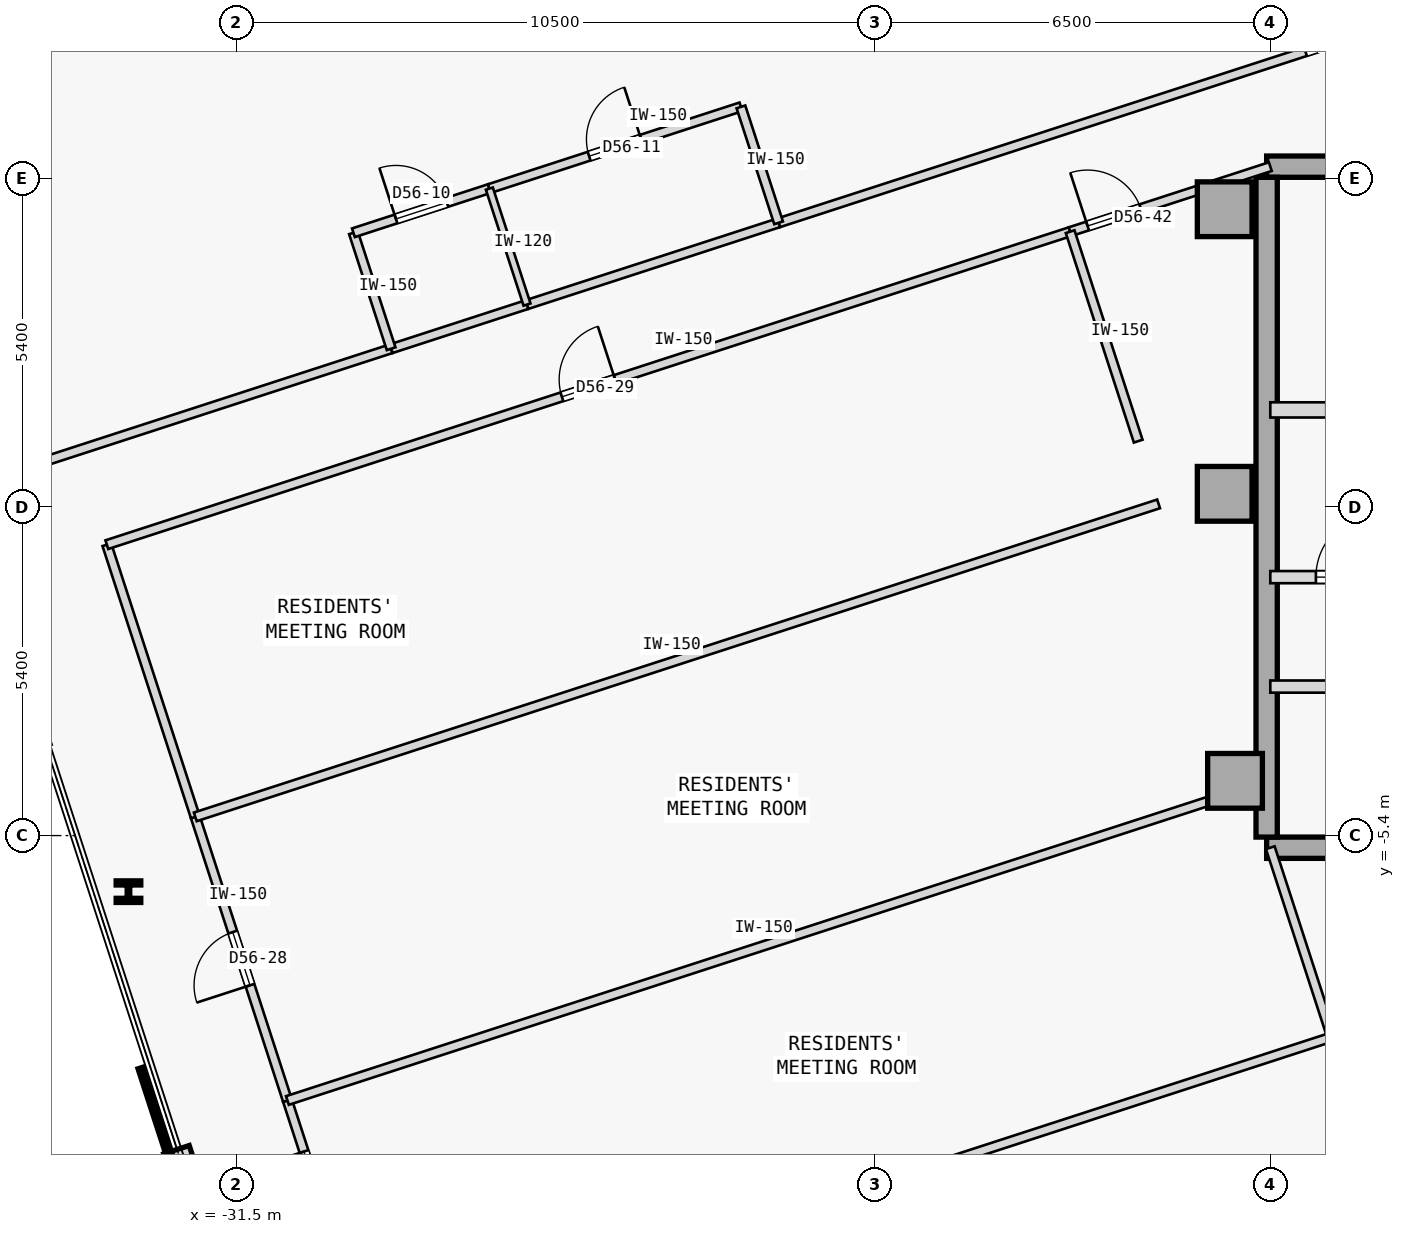
"""IFC4 building model, lengths in metres.
Left out: names, types, materials, properties, quantities, classifications, styles, units other than length and angle.
Written with IfcOpenShell. Run it as: python <this file> out.ifc"""

import sys

from ifc_helpers import new_model, si_unit, direction, frame, frame_2d, origin, origin_2d, place, context, subcontext, project, spatial, rectangle, i_section, extrude, element, fill, save


model = new_model("IFC4")
c1 = context("Model", 3, precision=1e-05, world=origin(), true_north=direction((0.0, 1.0)))
c2 = subcontext(c1, "Body", "Model", "MODEL_VIEW")
j1 = project(units=[si_unit("LENGTHUNIT", "METRE"), si_unit("PLANEANGLEUNIT", "RADIAN")], contexts=[c1])
p1 = place(None, origin())
s1 = spatial("IfcSite", under=j1, at=p1, CompositionType="ELEMENT")
p2 = place(p1, origin())
s2 = spatial("IfcBuilding", under=s1, at=p2, CompositionType="ELEMENT")
p3 = place(p2, frame((0.0, 0.0, 214.25)))
s3 = spatial("IfcBuildingStorey", under=s2, at=p3, CompositionType="ELEMENT", Elevation=214.25)
for number, where, z_axis, x_axis in (
    (1, (-15.25, 4.9, 0.0), (0.0, 0.0, 1.0), (1.0, 0.0, 0.0)),
    (2, (-15.25, 0.22, 0.0), (0.0, 0.0, 1.0), (1.0, 0.0, 0.0)),
    (3, (-15.08, -4.5, 0.0), (0.0, 0.0, 1.0), (1.0, 0.0, 0.0)),
):
    element("IfcColumn", number, at=place(p3, frame(where, z_axis=z_axis, x_axis=x_axis)), inside=s3, PredefinedType="COLUMN", context=c2, shape_type="SweptSolid", body=[
        extrude(rectangle(XDim=0.9, YDim=0.9, at=origin_2d()), origin(), (0.0, 0.0, 1.0), 3.35),
    ])
p4 = place(p3, frame((-14.56, 5.6, 0.0), z_axis=(0.0, 0.0, 1.0), x_axis=(1.0, 0.0, 0.0)))
e4 = element("IfcWall", 4, at=p4, inside=s3, PredefinedType="SHEAR", context=c2, shape_type="SweptSolid", body=[
    extrude(rectangle(XDim=11.41, YDim=0.35, at=frame_2d((5.705, 0.0))), origin(), (0.0, 0.0, 1.0), 3.125),
])
p5 = place(p3, frame((-14.56, -5.6, 0.0), z_axis=(0.0, 0.0, 1.0), x_axis=(1.0, 0.0, 0.0)))
e5 = element("IfcWall", 5, at=p5, inside=s3, PredefinedType="SHEAR", context=c2, shape_type="SweptSolid", body=[
    extrude(rectangle(XDim=10.86, YDim=0.35, at=frame_2d((5.43, 0.0))), origin(), (0.0, 0.0, 1.0), 3.125),
])
p6 = place(p3, frame((-14.56, -5.425, 0.0), z_axis=(0.0, 0.0, 1.0), x_axis=(0.0, 1.0, 0.0)))
e6 = element("IfcWall", 6, at=p6, inside=s3, PredefinedType="SHEAR", context=c2, shape_type="SweptSolid", body=[
    extrude(rectangle(XDim=10.85, YDim=0.35, at=frame_2d((5.425, 0.0))), origin(), (0.0, 0.0, 1.0), 3.125),
])
p7 = place(p3, frame((-33.278, -6.322, 0.0), z_axis=(0.0, 0.0, 1.0), x_axis=(1.0, 0.0, 0.0)))
e7 = element("IfcColumn", 7, at=p7, inside=s3, PredefinedType="COLUMN", context=c2, shape_type="SweptSolid", body=[
    extrude(i_section(OverallWidth=0.405, OverallDepth=0.355, WebThickness=0.042, FlangeThickness=0.068, FilletRadius=0.015, at=origin_2d()), origin(), (0.0, 0.0, 1.0), 3.35),
])
p8 = place(p3, frame((-14.5, 1.6, 0.0), z_axis=(0.0, 0.0, 1.0), x_axis=(1.0, 0.0, 0.0)))
e8 = element("IfcWall", 8, at=p8, inside=s3, PredefinedType="STANDARD", context=c2, shape_type="SweptSolid", body=[
    extrude(rectangle(XDim=3.6, YDim=0.25, at=frame_2d((1.8, 0.0))), origin(), (0.0, 0.0, 1.0), 3.125),
])
p9 = place(p8, frame((0.92, 0.0, 0.0)))
e9 = element("IfcOpeningElement", 9, at=p9, cuts=e8, PredefinedType="OPENING", context=c2, shape_type="SweptSolid", body=[
    extrude(rectangle(XDim=1.05, YDim=2.15, at=frame_2d((0.525, 1.075))), frame((0.0, 0.135, 0.0), z_axis=(0.0, -1.0, 0.0), x_axis=(1.0, 0.0, 0.0)), (0.0, 0.0, 1.0), 0.27),
])
p10 = place(p3, frame((-14.5, -1.15, 0.0), z_axis=(0.0, 0.0, 1.0), x_axis=(1.0, 0.0, 0.0)))
e10 = element("IfcWall", 10, at=p10, inside=s3, PredefinedType="STANDARD", context=c2, shape_type="SweptSolid", body=[
    extrude(rectangle(XDim=2.95, YDim=0.2, at=frame_2d((1.475, 0.0))), origin(), (0.0, 0.0, 1.0), 3.125),
])
p11 = place(p10, frame((0.75, 0.0, 0.0)))
e11 = element("IfcOpeningElement", 11, at=p11, cuts=e10, PredefinedType="OPENING", context=c2, shape_type="SweptSolid", body=[
    extrude(rectangle(XDim=1.05, YDim=2.18, at=frame_2d((0.525, 1.09))), frame((0.0, 0.11, 0.0), z_axis=(0.0, -1.0, 0.0), x_axis=(1.0, 0.0, 0.0)), (0.0, 0.0, 1.0), 0.22),
])
p12 = place(p3, frame((-14.5, -2.95, 0.0), z_axis=(0.0, 0.0, 1.0), x_axis=(1.0, 0.0, 0.0)))
e12 = element("IfcWall", 12, at=p12, inside=s3, PredefinedType="STANDARD", context=c2, shape_type="SweptSolid", body=[
    extrude(rectangle(XDim=10.8, YDim=0.2, at=frame_2d((5.4, 0.0))), origin(), (0.0, 0.0, 1.0), 3.125),
])
p13 = place(p12, frame((9.17, 0.0, 0.0)))
e13 = element("IfcOpeningElement", 13, at=p13, cuts=e12, PredefinedType="OPENING", context=c2, shape_type="SweptSolid", body=[
    extrude(rectangle(XDim=1.1, YDim=2.15, at=frame_2d((0.55, 1.075))), frame((0.0, 0.11, 0.0), z_axis=(0.0, -1.0, 0.0), x_axis=(1.0, 0.0, 0.0)), (0.0, 0.0, 1.0), 0.22),
])
p14 = place(p12, frame((2.13, 0.0, 0.0)))
e14 = element("IfcOpeningElement", 14, at=p14, cuts=e12, PredefinedType="OPENING", context=c2, shape_type="SweptSolid", body=[
    extrude(rectangle(XDim=0.92, YDim=2.15, at=frame_2d((0.46, 1.075))), frame((0.0, 0.11, 0.0), z_axis=(0.0, -1.0, 0.0), x_axis=(1.0, 0.0, 0.0)), (0.0, 0.0, 1.0), 0.22),
])
p15 = place(p12, frame((6.45, 0.0, 0.0)))
e15 = element("IfcOpeningElement", 15, at=p15, cuts=e12, PredefinedType="OPENING", context=c2, shape_type="SweptSolid", body=[
    extrude(rectangle(XDim=0.92, YDim=2.15, at=frame_2d((0.46, 1.075))), frame((0.0, 0.11, 0.0), z_axis=(0.0, -1.0, 0.0), x_axis=(1.0, 0.0, 0.0)), (0.0, 0.0, 1.0), 0.22),
])
p16 = place(p3, frame((-36.012, 0.314, 0.0), z_axis=(0.0, 0.0, 1.0), x_axis=(0.951055595173, 0.309019829283, 0.0)))
e16 = element("IfcWall", 16, at=p16, inside=s3, PredefinedType="PARTITIONING", context=c2, shape_type="SweptSolid", body=[
    extrude(rectangle(XDim=7.417, YDim=0.15, at=frame_2d((3.708, 0.0))), origin(), (0.0, 0.0, 1.0), 3.125),
])
p17 = place(p3, frame((-22.586, 4.677, 0.0), z_axis=(0.0, 0.0, 1.0), x_axis=(0.951057743275, 0.309013218095, 0.0)))
e17 = element("IfcWall", 17, at=p17, inside=s3, PredefinedType="PARTITIONING", context=c2, shape_type="SweptSolid", body=[
    extrude(rectangle(XDim=19.171, YDim=0.15, at=frame_2d((9.585, 0.0))), origin(), (0.0, 0.0, 1.0), 3.125),
])
p18 = place(p17, frame((9.111, 0.0, 0.0)))
e18 = element("IfcOpeningElement", 18, at=p18, cuts=e17, PredefinedType="OPENING", context=c2, shape_type="SweptSolid", body=[
    extrude(rectangle(XDim=0.95, YDim=2.15, at=frame_2d((0.475, 1.075))), frame((0.0, 0.085, 0.0), z_axis=(0.0, -1.0, 0.0), x_axis=(1.0, 0.0, 0.0)), (0.0, 0.0, 1.0), 0.17),
])
p19 = place(p3, frame((-28.958, 2.606, 0.0), z_axis=(0.0, 0.0, 1.0), x_axis=(0.951076048914, 0.308956872689, 0.0)))
e19 = element("IfcWall", 19, at=p19, inside=s3, PredefinedType="PARTITIONING", context=c2, shape_type="SweptSolid", body=[
    extrude(rectangle(XDim=2.35, YDim=0.15, at=frame_2d((1.175, 0.0))), origin(), (0.0, 0.0, 1.0), 3.125),
])
p20 = place(p3, frame((-26.723, 3.332, 0.0), z_axis=(0.0, 0.0, 1.0), x_axis=(0.951052627573, 0.309028962374, 0.0)))
e20 = element("IfcWall", 20, at=p20, inside=s3, PredefinedType="PARTITIONING", context=c2, shape_type="SweptSolid", body=[
    extrude(rectangle(XDim=4.35, YDim=0.15, at=frame_2d((2.175, 0.0))), origin(), (0.0, 0.0, 1.0), 3.125),
])
p21 = place(p3, frame((-29.833, -12.311, 0.0), z_axis=(0.0, 0.0, 1.0), x_axis=(-0.309044953986, 0.951047431213, 0.0)))
e21 = element("IfcWall", 21, at=p21, inside=s3, PredefinedType="PARTITIONING", context=c2, shape_type="SweptSolid", body=[
    extrude(rectangle(XDim=2.685, YDim=0.15, at=frame_2d((1.343, 0.0))), origin(), (0.0, 0.0, 1.0), 3.125),
])
p22 = place(p21, frame((0.883, 0.0, 0.0)))
e22 = element("IfcOpeningElement", 22, at=p22, cuts=e21, PredefinedType="OPENING", context=c2, shape_type="SweptSolid", body=[
    extrude(rectangle(XDim=0.92, YDim=2.15, at=frame_2d((0.46, 1.075))), frame((0.0, 0.085, 0.0), z_axis=(0.0, -1.0, 0.0), x_axis=(1.0, 0.0, 0.0)), (0.0, 0.0, 1.0), 0.17),
])
p23 = place(p3, frame((-30.663, -9.757, 0.0), z_axis=(0.0, 0.0, 1.0), x_axis=(-0.309019653166, 0.951055652397, 0.0)))
e23 = element("IfcWall", 23, at=p23, inside=s3, PredefinedType="PARTITIONING", context=c2, shape_type="SweptSolid", body=[
    extrude(rectangle(XDim=4.904, YDim=0.15, at=frame_2d((2.452, 0.0))), origin(), (0.0, 0.0, 1.0), 3.125),
])
p24 = place(p23, frame((1.992, 0.0, 0.0)))
e24 = element("IfcOpeningElement", 24, at=p24, cuts=e23, PredefinedType="OPENING", context=c2, shape_type="SweptSolid", body=[
    extrude(rectangle(XDim=0.92, YDim=2.15, at=frame_2d((0.46, 1.075))), frame((0.0, 0.085, 0.0), z_axis=(0.0, -1.0, 0.0), x_axis=(1.0, 0.0, 0.0)), (0.0, 0.0, 1.0), 0.17),
])
p25 = place(p3, frame((-32.179, -5.093, 0.0), z_axis=(0.0, 0.0, 1.0), x_axis=(-0.309014532869, 0.951057316083, 0.0)))
e25 = element("IfcWall", 25, at=p25, inside=s3, PredefinedType="PARTITIONING", context=c2, shape_type="SweptSolid", body=[
    extrude(rectangle(XDim=4.707, YDim=0.15, at=frame_2d((2.354, 0.0))), origin(), (0.0, 0.0, 1.0), 3.125),
])
p26 = place(p3, frame((-33.633, -0.616, 0.0), z_axis=(0.0, 0.0, 1.0), x_axis=(0.951058192995, 0.309011833974, 0.0)))
e26 = element("IfcWall", 26, at=p26, inside=s3, PredefinedType="PARTITIONING", context=c2, shape_type="SweptSolid", body=[
    extrude(rectangle(XDim=16.657, YDim=0.15, at=frame_2d((8.329, 0.0))), origin(), (0.0, 0.0, 1.0), 3.125),
])
p27 = place(p26, frame((7.868, 0.0, 0.0)))
e27 = element("IfcOpeningElement", 27, at=p27, cuts=e26, PredefinedType="OPENING", context=c2, shape_type="SweptSolid", body=[
    extrude(rectangle(XDim=0.92, YDim=2.15, at=frame_2d((0.46, 1.075))), frame((0.0, 0.085, 0.0), z_axis=(0.0, -1.0, 0.0), x_axis=(1.0, 0.0, 0.0)), (0.0, 0.0, 1.0), 0.17),
])
p28 = place(p3, frame((-17.792, 4.531, 0.0), z_axis=(0.0, 0.0, 1.0), x_axis=(0.951047546178, 0.309044600193, 0.0)))
e28 = element("IfcWall", 28, at=p28, inside=s3, PredefinedType="PARTITIONING", context=c2, shape_type="SweptSolid", body=[
    extrude(rectangle(XDim=3.461, YDim=0.15, at=frame_2d((1.73, 0.0))), origin(), (0.0, 0.0, 1.0), 3.125),
])
p29 = place(p28, frame((0.302, 0.0, 0.0)))
e29 = element("IfcOpeningElement", 29, at=p29, cuts=e28, PredefinedType="OPENING", context=c2, shape_type="SweptSolid", body=[
    extrude(rectangle(XDim=0.92, YDim=2.15, at=frame_2d((0.46, 1.075))), frame((0.0, 0.085, 0.0), z_axis=(0.0, -1.0, 0.0), x_axis=(1.0, 0.0, 0.0)), (0.0, 0.0, 1.0), 0.17),
])
p30 = place(p3, frame((-28.958, 2.606, 0.0), z_axis=(0.0, 0.0, 1.0), x_axis=(-0.309058537449, 0.951043017129, 0.0)))
e30 = element("IfcWall", 30, at=p30, inside=s3, PredefinedType="PARTITIONING", context=c2, shape_type="SweptSolid", body=[
    extrude(rectangle(XDim=2.005, YDim=0.15, at=frame_2d((1.002, 0.0))), origin(), (0.0, 0.0, 1.0), 3.125),
])
p31 = place(p3, frame((-29.578, 4.513, 0.0), z_axis=(0.0, 0.0, 1.0), x_axis=(0.951076048914, 0.308956872689, 0.0)))
e31 = element("IfcWall", 31, at=p31, inside=s3, PredefinedType="PARTITIONING", context=c2, shape_type="SweptSolid", body=[
    extrude(rectangle(XDim=2.35, YDim=0.15, at=frame_2d((1.175, 0.0))), origin(), (0.0, 0.0, 1.0), 3.125),
])
p32 = place(p31, frame((0.735, 0.0, 0.0)))
e32 = element("IfcOpeningElement", 32, at=p32, cuts=e31, PredefinedType="OPENING", context=c2, shape_type="SweptSolid", body=[
    extrude(rectangle(XDim=0.88, YDim=2.15, at=frame_2d((0.44, 1.075))), frame((0.0, 0.085, 0.0), z_axis=(0.0, -1.0, 0.0), x_axis=(1.0, 0.0, 0.0)), (0.0, 0.0, 1.0), 0.17),
])
p33 = place(p3, frame((-27.343, 5.239, 0.0), z_axis=(0.0, 0.0, 1.0), x_axis=(0.951036130958, 0.309079726951, 0.0)))
e33 = element("IfcWall", 33, at=p33, inside=s3, PredefinedType="PARTITIONING", context=c2, shape_type="SweptSolid", body=[
    extrude(rectangle(XDim=4.35, YDim=0.15, at=frame_2d((2.175, 0.0))), origin(), (0.0, 0.0, 1.0), 3.125),
])
p34 = place(p33, frame((1.725, 0.0, 0.0)))
e34 = element("IfcOpeningElement", 34, at=p34, cuts=e33, PredefinedType="OPENING", context=c2, shape_type="SweptSolid", body=[
    extrude(rectangle(XDim=0.9, YDim=2.15, at=frame_2d((0.45, 1.075))), frame((0.0, 0.085, 0.0), z_axis=(0.0, -1.0, 0.0), x_axis=(1.0, 0.0, 0.0)), (0.0, 0.0, 1.0), 0.17),
])
p35 = place(p3, frame((-22.586, 4.677, 0.0), z_axis=(0.0, 0.0, 1.0), x_axis=(-0.309022749039, 0.951054646472, 0.0)))
e35 = element("IfcWall", 35, at=p35, inside=s3, PredefinedType="PARTITIONING", context=c2, shape_type="SweptSolid", body=[
    extrude(rectangle(XDim=2.005, YDim=0.15, at=frame_2d((1.002, 0.0))), origin(), (0.0, 0.0, 1.0), 3.125),
])
p36 = place(p3, frame((-26.723, 3.332, 0.0), z_axis=(0.0, 0.0, 1.0), x_axis=(-0.309058537449, 0.951043017129, 0.0)))
e36 = element("IfcWall", 36, at=p36, inside=s3, PredefinedType="PARTITIONING", context=c2, shape_type="SweptSolid", body=[
    extrude(rectangle(XDim=2.005, YDim=0.12, at=frame_2d((1.002, 0.0))), origin(), (0.0, 0.0, 1.0), 3.125),
])
p37 = place(p3, frame((-31.208, -14.471, 0.0), z_axis=(0.0, 0.0, 1.0), x_axis=(0.951057753948, 0.309013185244, 0.0)))
e37 = element("IfcWall", 37, at=p37, inside=s3, PredefinedType="PARTITIONING", context=c2, shape_type="SweptSolid", body=[
    extrude(rectangle(XDim=18.632, YDim=0.15, at=frame_2d((9.316, 0.0))), origin(), (0.0, 0.0, 1.0), 3.125),
])
p38 = place(p3, frame((-30.663, -9.757, 0.0), z_axis=(0.0, 0.0, 1.0), x_axis=(0.951058192995, 0.309011833974, 0.0)))
e38 = element("IfcWall", 38, at=p38, inside=s3, PredefinedType="PARTITIONING", context=c2, shape_type="SweptSolid", body=[
    extrude(rectangle(XDim=16.657, YDim=0.15, at=frame_2d((8.329, 0.0))), origin(), (0.0, 0.0, 1.0), 3.125),
])
p39 = place(p3, frame((-13.488, -8.713, 0.0), z_axis=(0.0, 0.0, 1.0), x_axis=(-0.309082700143, 0.951035164687, 0.0)))
e39 = element("IfcWall", 39, at=p39, inside=s3, PredefinedType="PARTITIONING", context=c2, shape_type="SweptSolid", body=[
    extrude(rectangle(XDim=3.274, YDim=0.15, at=frame_2d((1.637, 0.0))), origin(), (0.0, 0.0, 1.0), 3.125),
])
p40 = place(p3, frame((-32.179, -5.093, 0.0), z_axis=(0.0, 0.0, 1.0), x_axis=(0.951053885426, 0.309025091239, 0.0)))
e40 = element("IfcWall", 40, at=p40, inside=s3, PredefinedType="PARTITIONING", context=c2, shape_type="SweptSolid", body=[
    extrude(rectangle(XDim=16.657, YDim=0.15, at=frame_2d((8.329, 0.0))), origin(), (0.0, 0.0, 1.0), 3.125),
])
p41 = place(p3, frame((-16.672, 1.086, 0.0), z_axis=(0.0, 0.0, 1.0), x_axis=(-0.308979382511, 0.951068736308, 0.0)))
e41 = element("IfcWall", 41, at=p41, inside=s3, PredefinedType="PARTITIONING", context=c2, shape_type="SweptSolid", body=[
    extrude(rectangle(XDim=3.622, YDim=0.15, at=frame_2d((1.811, 0.0))), origin(), (0.0, 0.0, 1.0), 3.125),
])
p42 = place(p11, origin())
e42 = element("IfcDoor", 42, at=p42, inside=s3, OperationType="SINGLE_SWING_RIGHT", PredefinedType="DOOR", context=c2, shape_type="SweptSolid", body=[
    extrude(rectangle(XDim=1.05, YDim=2.18, at=frame_2d((0.525, 1.09))), frame((0.0, 0.025, 0.0), z_axis=(0.0, -1.0, 0.0), x_axis=(1.0, 0.0, 0.0)), (0.0, 0.0, 1.0), 0.05),
])
fill(e11, e42)
p43 = place(p18, origin())
e43 = element("IfcDoor", 43, at=p43, inside=s3, OperationType="SINGLE_SWING_RIGHT", PredefinedType="DOOR", context=c2, shape_type="SweptSolid", body=[
    extrude(rectangle(XDim=0.95, YDim=2.15, at=frame_2d((0.475, 1.075))), frame((0.0, 0.025, 0.0), z_axis=(0.0, -1.0, 0.0), x_axis=(1.0, 0.0, 0.0)), (0.0, 0.0, 1.0), 0.05),
])
fill(e18, e43)
p44 = place(p32, origin())
e44 = element("IfcDoor", 44, at=p44, inside=s3, OperationType="SINGLE_SWING_LEFT", PredefinedType="DOOR", context=c2, shape_type="SweptSolid", body=[
    extrude(rectangle(XDim=0.88, YDim=2.15, at=frame_2d((0.44, 1.075))), frame((0.0, 0.025, 0.0), z_axis=(0.0, -1.0, 0.0), x_axis=(1.0, 0.0, 0.0)), (0.0, 0.0, 1.0), 0.05),
])
fill(e32, e44)
p45 = place(p34, origin())
e45 = element("IfcDoor", 45, at=p45, inside=s3, OperationType="SINGLE_SWING_RIGHT", PredefinedType="DOOR", context=c2, shape_type="SweptSolid", body=[
    extrude(rectangle(XDim=0.9, YDim=2.15, at=frame_2d((0.45, 1.075))), frame((0.0, 0.025, 0.0), z_axis=(0.0, -1.0, 0.0), x_axis=(1.0, 0.0, 0.0)), (0.0, 0.0, 1.0), 0.05),
])
fill(e34, e45)
p46 = place(p22, origin())
e46 = element("IfcDoor", 46, at=p46, inside=s3, OperationType="SINGLE_SWING_RIGHT", PredefinedType="DOOR", context=c2, shape_type="SweptSolid", body=[
    extrude(rectangle(XDim=0.92, YDim=2.15, at=frame_2d((0.46, 1.075))), frame((0.0, 0.025, 0.0), z_axis=(0.0, -1.0, 0.0), x_axis=(1.0, 0.0, 0.0)), (0.0, 0.0, 1.0), 0.05),
])
fill(e22, e46)
p47 = place(p24, origin())
e47 = element("IfcDoor", 47, at=p47, inside=s3, OperationType="SINGLE_SWING_LEFT", PredefinedType="DOOR", context=c2, shape_type="SweptSolid", body=[
    extrude(rectangle(XDim=0.92, YDim=2.15, at=frame_2d((0.46, 1.075))), frame((0.0, 0.025, 0.0), z_axis=(0.0, -1.0, 0.0), x_axis=(1.0, 0.0, 0.0)), (0.0, 0.0, 1.0), 0.05),
])
fill(e24, e47)
p48 = place(p27, origin())
e48 = element("IfcDoor", 48, at=p48, inside=s3, OperationType="SINGLE_SWING_RIGHT", PredefinedType="DOOR", context=c2, shape_type="SweptSolid", body=[
    extrude(rectangle(XDim=0.92, YDim=2.15, at=frame_2d((0.46, 1.075))), frame((0.0, 0.025, 0.0), z_axis=(0.0, -1.0, 0.0), x_axis=(1.0, 0.0, 0.0)), (0.0, 0.0, 1.0), 0.05),
])
fill(e27, e48)
p49 = place(p29, origin())
e49 = element("IfcDoor", 49, at=p49, inside=s3, OperationType="SINGLE_SWING_LEFT", PredefinedType="DOOR", context=c2, shape_type="SweptSolid", body=[
    extrude(rectangle(XDim=0.92, YDim=2.15, at=frame_2d((0.46, 1.075))), frame((0.0, 0.025, 0.0), z_axis=(0.0, -1.0, 0.0), x_axis=(1.0, 0.0, 0.0)), (0.0, 0.0, 1.0), 0.05),
])
fill(e29, e49)
save(model, sys.argv[1])
